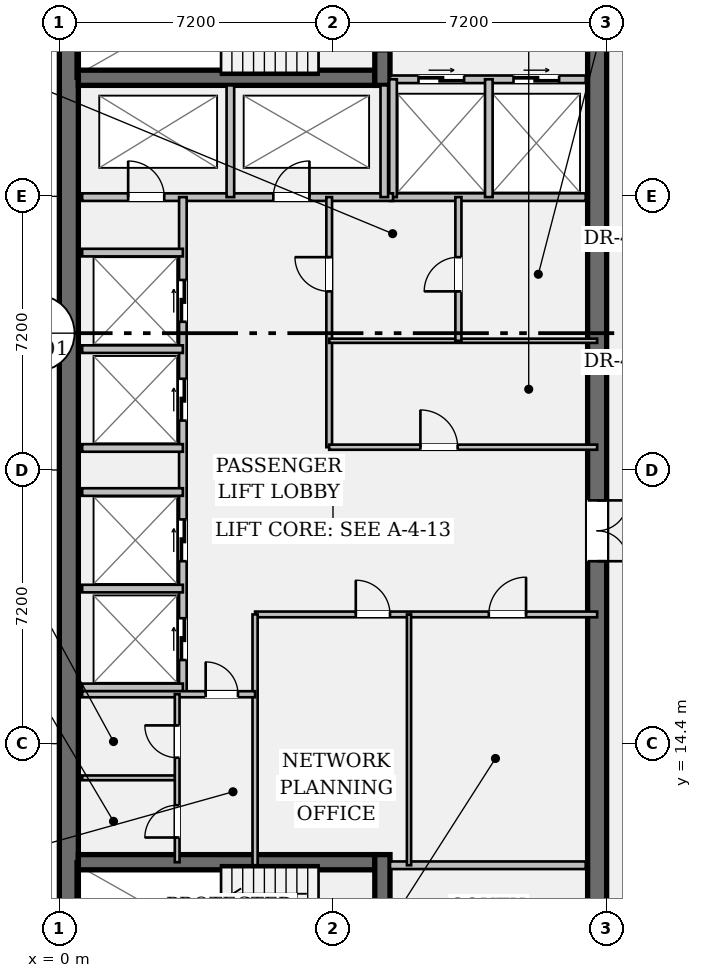
"""IFC4 building model, lengths in metres.
Left out: names, types, materials, properties, quantities, classifications, styles, units other than length and angle.
Written with IfcOpenShell. Run it as: python <this file> out.ifc"""

import sys

from ifc_helpers import new_model, si_unit, direction, frame, frame_2d, origin, place, context, subcontext, project, spatial, rectangle, extrude, element, fill, save


model = new_model("IFC4")
c1 = context("Model", 3, precision=1e-05, world=origin(), true_north=direction((0.0, 1.0)))
c2 = subcontext(c1, "Body", "Model", "MODEL_VIEW")
j1 = project(units=[si_unit("LENGTHUNIT", "METRE"), si_unit("PLANEANGLEUNIT", "RADIAN")], contexts=[c1])
p1 = place(None, origin())
s1 = spatial("IfcSite", under=j1, at=p1, CompositionType="ELEMENT")
p2 = place(p1, origin())
s2 = spatial("IfcBuilding", under=s1, at=p2, CompositionType="ELEMENT")
p3 = place(p2, frame((0.0, 0.0, 290.15)))
s3 = spatial("IfcBuildingStorey", under=s2, at=p3, CompositionType="ELEMENT", Elevation=290.15)
p4 = place(p3, frame((0.25, 7.2, 0.0), z_axis=(0.0, 0.0, 1.0), x_axis=(0.0, 1.0, 0.0)))
e1 = element("IfcWall", 1, at=p4, inside=s3, PredefinedType="SHEAR", context=c2, shape_type="SweptSolid", body=[
    extrude(rectangle(XDim=28.8, YDim=0.5, at=frame_2d((14.4, 0.0))), origin(), (0.0, 0.0, 1.0), 3.24),
])
p5 = place(p3, frame((14.15, 35.5, 0.0), z_axis=(0.0, 0.0, 1.0), x_axis=(0.0, -1.0, 0.0)))
e2 = element("IfcWall", 2, at=p5, inside=s3, PredefinedType="SHEAR", context=c2, shape_type="SweptSolid", body=[
    extrude(rectangle(XDim=27.8, YDim=0.5, at=frame_2d((13.9, 0.0))), origin(), (0.0, 0.0, 1.0), 3.24),
])
p6 = place(p5, frame((1.4, 0.0, 0.0)))
e3 = element("IfcOpeningElement", 3, at=p6, cuts=e2, PredefinedType="OPENING", context=c2, shape_type="SweptSolid", body=[
    extrude(rectangle(XDim=1.2, YDim=2.15, at=frame_2d((0.6, 1.075))), frame((0.0, 0.262, 0.0), z_axis=(0.0, -1.0, 0.0), x_axis=(1.0, 0.0, 0.0)), (0.0, 0.0, 1.0), 0.524),
])
p7 = place(p5, frame((25.35, 0.0, 0.0)))
e4 = element("IfcOpeningElement", 4, at=p7, cuts=e2, PredefinedType="OPENING", context=c2, shape_type="SweptSolid", body=[
    extrude(rectangle(XDim=1.2, YDim=2.15, at=frame_2d((0.6, 1.075))), frame((0.0, 0.262, 0.0), z_axis=(0.0, -1.0, 0.0), x_axis=(1.0, 0.0, 0.0)), (0.0, 0.0, 1.0), 0.524),
])
p8 = place(p5, frame((14.7, 0.0, 0.0)))
e5 = element("IfcOpeningElement", 5, at=p8, cuts=e2, PredefinedType="OPENING", context=c2, shape_type="SweptSolid", body=[
    extrude(rectangle(XDim=1.6, YDim=2.2, at=frame_2d((0.8, 1.1))), frame((0.0, 0.262, 0.0), z_axis=(0.0, -1.0, 0.0), x_axis=(1.0, 0.0, 0.0)), (0.0, 0.0, 1.0), 0.524),
])
for number, where, z_axis, x_axis in (
    (6, (0.5, 31.92, 0.0), (0.0, 0.0, 1.0), (1.0, 0.0, 0.0)),
    (7, (0.5, 11.28, 0.0), (0.0, 0.0, 1.0), (1.0, 0.0, 0.0)),
):
    element("IfcWall", number, at=place(p3, frame(where, z_axis=z_axis, x_axis=x_axis)), inside=s3, PredefinedType="SHEAR", context=c2, shape_type="SweptSolid", body=[
        extrude(rectangle(XDim=7.8, YDim=0.4, at=frame_2d((3.9, 0.0))), origin(), (0.0, 0.0, 1.0), 3.24),
    ])
p9 = place(p3, frame((8.5, 31.72, 0.0), z_axis=(0.0, 0.0, 1.0), x_axis=(0.0, 1.0, 0.0)))
e8 = element("IfcWall", 8, at=p9, inside=s3, PredefinedType="SHEAR", context=c2, shape_type="SweptSolid", body=[
    extrude(rectangle(XDim=3.78, YDim=0.4, at=frame_2d((1.89, 0.0))), origin(), (0.0, 0.0, 1.0), 3.24),
])
p10 = place(p9, frame((0.9, 0.0, 0.0)))
e9 = element("IfcOpeningElement", 9, at=p10, cuts=e8, PredefinedType="OPENING", context=c2, shape_type="SweptSolid", body=[
    extrude(rectangle(XDim=1.1, YDim=2.15, at=frame_2d((0.55, 1.075))), frame((0.0, 0.212, 0.0), z_axis=(0.0, -1.0, 0.0), x_axis=(1.0, 0.0, 0.0)), (0.0, 0.0, 1.0), 0.424),
])
p11 = place(p3, frame((8.5, 7.7, 0.0), z_axis=(0.0, 0.0, 1.0), x_axis=(0.0, 1.0, 0.0)))
e10 = element("IfcWall", 10, at=p11, inside=s3, PredefinedType="SHEAR", context=c2, shape_type="SweptSolid", body=[
    extrude(rectangle(XDim=3.78, YDim=0.4, at=frame_2d((1.89, 0.0))), origin(), (0.0, 0.0, 1.0), 3.24),
])
p12 = place(p11, frame((0.85, 0.0, 0.0)))
e11 = element("IfcOpeningElement", 11, at=p12, cuts=e10, PredefinedType="OPENING", context=c2, shape_type="SweptSolid", body=[
    extrude(rectangle(XDim=1.1, YDim=2.15, at=frame_2d((0.55, 1.075))), frame((0.0, 0.212, 0.0), z_axis=(0.0, -1.0, 0.0), x_axis=(1.0, 0.0, 0.0)), (0.0, 0.0, 1.0), 0.424),
])
p13 = place(p3, frame((8.7, 31.88, 0.0), z_axis=(0.0, 0.0, 1.0), x_axis=(1.0, 0.0, 0.0)))
e12 = element("IfcWall", 12, at=p13, inside=s3, PredefinedType="PARTITIONING", context=c2, shape_type="SweptSolid", body=[
    extrude(rectangle(XDim=5.15, YDim=0.2, at=frame_2d((2.575, 0.0))), origin(), (0.0, 0.0, 1.0), 3.24),
])
p14 = place(p13, frame((0.75, 0.0, 0.0)))
e13 = element("IfcOpeningElement", 13, at=p14, cuts=e12, PredefinedType="OPENING", context=c2, shape_type="SweptSolid", body=[
    extrude(rectangle(XDim=1.2, YDim=2.2, at=frame_2d((0.6, 1.1))), frame((0.0, 0.112, 0.0), z_axis=(0.0, -1.0, 0.0), x_axis=(1.0, 0.0, 0.0)), (0.0, 0.0, 1.0), 0.224),
])
p15 = place(p13, frame((3.25, 0.0, 0.0)))
e14 = element("IfcOpeningElement", 14, at=p15, cuts=e12, PredefinedType="OPENING", context=c2, shape_type="SweptSolid", body=[
    extrude(rectangle(XDim=1.2, YDim=2.2, at=frame_2d((0.6, 1.1))), frame((0.0, 0.112, 0.0), z_axis=(0.0, -1.0, 0.0), x_axis=(1.0, 0.0, 0.0)), (0.0, 0.0, 1.0), 0.224),
])
for number, where, z_axis, x_axis in (
    (15, (8.7, 11.2, 0.0), (0.0, 0.0, 1.0), (1.0, 0.0, 0.0)),
    (16, (8.7, 28.78, 0.0), (0.0, 0.0, 1.0), (1.0, 0.0, 0.0)),
):
    element("IfcWall", number, at=place(p3, frame(where, z_axis=z_axis, x_axis=x_axis)), inside=s3, PredefinedType="PARTITIONING", context=c2, shape_type="SweptSolid", body=[
        extrude(rectangle(XDim=5.15, YDim=0.2, at=frame_2d((2.575, 0.0))), origin(), (0.0, 0.0, 1.0), 3.24),
    ])
for number, where, z_axis, x_axis in (
    (17, (8.78, 28.78, 0.0), (0.0, 0.0, 1.0), (0.0, 1.0, 0.0)),
    (18, (11.3, 28.78, 0.0), (0.0, 0.0, 1.0), (0.0, 1.0, 0.0)),
):
    element("IfcWall", number, at=place(p3, frame(where, z_axis=z_axis, x_axis=x_axis)), inside=s3, PredefinedType="PARTITIONING", context=c2, shape_type="SweptSolid", body=[
        extrude(rectangle(XDim=3.1, YDim=0.2, at=frame_2d((1.55, 0.0))), origin(), (0.0, 0.0, 1.0), 3.24),
    ])
p16 = place(p3, frame((0.6, 28.78, 0.0), z_axis=(0.0, 0.0, 1.0), x_axis=(1.0, 0.0, 0.0)))
e19 = element("IfcWall", 19, at=p16, inside=s3, PredefinedType="PARTITIONING", context=c2, shape_type="SweptSolid", body=[
    extrude(rectangle(XDim=8.18, YDim=0.2, at=frame_2d((4.09, 0.0))), origin(), (0.0, 0.0, 1.0), 3.24),
])
p17 = place(p16, frame((1.21, 0.0, 0.0)))
e20 = element("IfcOpeningElement", 20, at=p17, cuts=e19, PredefinedType="OPENING", context=c2, shape_type="SweptSolid", body=[
    extrude(rectangle(XDim=0.95, YDim=2.15, at=frame_2d((0.475, 1.075))), frame((0.0, 0.112, 0.0), z_axis=(0.0, -1.0, 0.0), x_axis=(1.0, 0.0, 0.0)), (0.0, 0.0, 1.0), 0.224),
])
p18 = place(p16, frame((5.03, 0.0, 0.0)))
e21 = element("IfcOpeningElement", 21, at=p18, cuts=e19, PredefinedType="OPENING", context=c2, shape_type="SweptSolid", body=[
    extrude(rectangle(XDim=0.95, YDim=2.15, at=frame_2d((0.475, 1.075))), frame((0.0, 0.112, 0.0), z_axis=(0.0, -1.0, 0.0), x_axis=(1.0, 0.0, 0.0)), (0.0, 0.0, 1.0), 0.224),
])
for number, where, z_axis, x_axis in (
    (22, (4.5, 28.78, 0.0), (0.0, 0.0, 1.0), (0.0, 1.0, 0.0)),
    (23, (8.55, 28.78, 0.0), (0.0, 0.0, 1.0), (0.0, 1.0, 0.0)),
):
    element("IfcWall", number, at=place(p3, frame(where, z_axis=z_axis, x_axis=x_axis)), inside=s3, PredefinedType="PARTITIONING", context=c2, shape_type="SweptSolid", body=[
        extrude(rectangle(XDim=2.94, YDim=0.2, at=frame_2d((1.47, 0.0))), origin(), (0.0, 0.0, 1.0), 3.24),
    ])
p19 = place(p3, frame((3.25, 15.7, 0.0), z_axis=(0.0, 0.0, 1.0), x_axis=(0.0, 1.0, 0.0)))
e24 = element("IfcWall", 24, at=p19, inside=s3, PredefinedType="PARTITIONING", context=c2, shape_type="SweptSolid", body=[
    extrude(rectangle(XDim=13.08, YDim=0.2, at=frame_2d((6.54, 0.0))), origin(), (0.0, 0.0, 1.0), 3.24),
])
p20 = place(p19, frame((0.9, 0.0, 0.0)))
e25 = element("IfcOpeningElement", 25, at=p20, cuts=e24, PredefinedType="OPENING", context=c2, shape_type="SweptSolid", body=[
    extrude(rectangle(XDim=1.1, YDim=2.2, at=frame_2d((0.55, 1.1))), frame((0.0, 0.112, 0.0), z_axis=(0.0, -1.0, 0.0), x_axis=(1.0, 0.0, 0.0)), (0.0, 0.0, 1.0), 0.224),
])
p21 = place(p19, frame((3.5, 0.0, 0.0)))
e26 = element("IfcOpeningElement", 26, at=p21, cuts=e24, PredefinedType="OPENING", context=c2, shape_type="SweptSolid", body=[
    extrude(rectangle(XDim=1.1, YDim=2.2, at=frame_2d((0.55, 1.1))), frame((0.0, 0.112, 0.0), z_axis=(0.0, -1.0, 0.0), x_axis=(1.0, 0.0, 0.0)), (0.0, 0.0, 1.0), 0.224),
])
p22 = place(p19, frame((7.2, 0.0, 0.0)))
e27 = element("IfcOpeningElement", 27, at=p22, cuts=e24, PredefinedType="OPENING", context=c2, shape_type="SweptSolid", body=[
    extrude(rectangle(XDim=1.1, YDim=2.2, at=frame_2d((0.55, 1.1))), frame((0.0, 0.112, 0.0), z_axis=(0.0, -1.0, 0.0), x_axis=(1.0, 0.0, 0.0)), (0.0, 0.0, 1.0), 0.224),
])
p23 = place(p19, frame((9.8, 0.0, 0.0)))
e28 = element("IfcOpeningElement", 28, at=p23, cuts=e24, PredefinedType="OPENING", context=c2, shape_type="SweptSolid", body=[
    extrude(rectangle(XDim=1.1, YDim=2.2, at=frame_2d((0.55, 1.1))), frame((0.0, 0.112, 0.0), z_axis=(0.0, -1.0, 0.0), x_axis=(1.0, 0.0, 0.0)), (0.0, 0.0, 1.0), 0.224),
])
for number, where, z_axis, x_axis in (
    (29, (0.6, 15.88, 0.0), (0.0, 0.0, 1.0), (1.0, 0.0, 0.0)),
    (30, (0.6, 18.48, 0.0), (0.0, 0.0, 1.0), (1.0, 0.0, 0.0)),
    (31, (0.6, 22.18, 0.0), (0.0, 0.0, 1.0), (1.0, 0.0, 0.0)),
    (32, (0.6, 24.78, 0.0), (0.0, 0.0, 1.0), (1.0, 0.0, 0.0)),
    (33, (0.6, 21.02, 0.0), (0.0, 0.0, 1.0), (1.0, 0.0, 0.0)),
    (34, (0.6, 27.32, 0.0), (0.0, 0.0, 1.0), (1.0, 0.0, 0.0)),
):
    element("IfcWall", number, at=place(p3, frame(where, z_axis=z_axis, x_axis=x_axis)), inside=s3, PredefinedType="PARTITIONING", context=c2, shape_type="SweptSolid", body=[
        extrude(rectangle(XDim=2.65, YDim=0.2, at=frame_2d((1.325, 0.0))), origin(), (0.0, 0.0, 1.0), 3.24),
    ])
p24 = place(p3, frame((7.1, 22.2, 0.0), z_axis=(0.0, 0.0, 1.0), x_axis=(0.0, 1.0, 0.0)))
e35 = element("IfcWall", 35, at=p24, inside=s3, PredefinedType="PARTITIONING", context=c2, shape_type="SweptSolid", body=[
    extrude(rectangle(XDim=6.58, YDim=0.15, at=frame_2d((3.29, 0.0))), origin(), (0.0, 0.0, 1.0), 3.24),
])
p25 = place(p24, frame((4.1, 0.0, 0.0)))
e36 = element("IfcOpeningElement", 36, at=p25, cuts=e35, PredefinedType="OPENING", context=c2, shape_type="SweptSolid", body=[
    extrude(rectangle(XDim=0.9, YDim=2.15, at=frame_2d((0.45, 1.075))), frame((0.0, 0.087, 0.0), z_axis=(0.0, -1.0, 0.0), x_axis=(1.0, 0.0, 0.0)), (0.0, 0.0, 1.0), 0.174),
])
p26 = place(p3, frame((7.1, 22.2, 0.0), z_axis=(0.0, 0.0, 1.0), x_axis=(1.0, 0.0, 0.0)))
e37 = element("IfcWall", 37, at=p26, inside=s3, PredefinedType="PARTITIONING", context=c2, shape_type="SweptSolid", body=[
    extrude(rectangle(XDim=7.05, YDim=0.135, at=frame_2d((3.525, 0.0))), origin(), (0.0, 0.0, 1.0), 3.24),
])
p27 = place(p26, frame((2.4, 0.0, 0.0)))
e38 = element("IfcOpeningElement", 38, at=p27, cuts=e37, PredefinedType="OPENING", context=c2, shape_type="SweptSolid", body=[
    extrude(rectangle(XDim=0.98, YDim=2.15, at=frame_2d((0.49, 1.075))), frame((0.0, 0.08, 0.0), z_axis=(0.0, -1.0, 0.0), x_axis=(1.0, 0.0, 0.0)), (0.0, 0.0, 1.0), 0.159),
])
p28 = place(p3, frame((7.1, 25.0, 0.0), z_axis=(0.0, 0.0, 1.0), x_axis=(1.0, 0.0, 0.0)))
e39 = element("IfcWall", 39, at=p28, inside=s3, PredefinedType="PARTITIONING", context=c2, shape_type="SweptSolid", body=[
    extrude(rectangle(XDim=7.05, YDim=0.11, at=frame_2d((3.525, 0.0))), origin(), (0.0, 0.0, 1.0), 3.24),
])
p29 = place(p3, frame((10.5, 25.0, 0.0), z_axis=(0.0, 0.0, 1.0), x_axis=(0.0, 1.0, 0.0)))
e40 = element("IfcWall", 40, at=p29, inside=s3, PredefinedType="PARTITIONING", context=c2, shape_type="SweptSolid", body=[
    extrude(rectangle(XDim=3.78, YDim=0.16, at=frame_2d((1.89, 0.0))), origin(), (0.0, 0.0, 1.0), 3.24),
])
p30 = place(p29, frame((1.3, 0.0, 0.0)))
e41 = element("IfcOpeningElement", 41, at=p30, cuts=e40, PredefinedType="OPENING", context=c2, shape_type="SweptSolid", body=[
    extrude(rectangle(XDim=0.9, YDim=2.15, at=frame_2d((0.45, 1.075))), frame((0.0, 0.092, 0.0), z_axis=(0.0, -1.0, 0.0), x_axis=(1.0, 0.0, 0.0)), (0.0, 0.0, 1.0), 0.184),
])
p31 = place(p3, frame((5.15, 17.8, 0.0), z_axis=(0.0, 0.0, 1.0), x_axis=(1.0, 0.0, 0.0)))
e42 = element("IfcWall", 42, at=p31, inside=s3, PredefinedType="PARTITIONING", context=c2, shape_type="SweptSolid", body=[
    extrude(rectangle(XDim=9.0, YDim=0.15, at=frame_2d((4.5, 0.0))), origin(), (0.0, 0.0, 1.0), 3.24),
])
p32 = place(p31, frame((2.65, 0.0, 0.0)))
e43 = element("IfcOpeningElement", 43, at=p32, cuts=e42, PredefinedType="OPENING", context=c2, shape_type="SweptSolid", body=[
    extrude(rectangle(XDim=0.9, YDim=2.15, at=frame_2d((0.45, 1.075))), frame((0.0, 0.087, 0.0), z_axis=(0.0, -1.0, 0.0), x_axis=(1.0, 0.0, 0.0)), (0.0, 0.0, 1.0), 0.174),
])
p33 = place(p31, frame((6.15, 0.0, 0.0)))
e44 = element("IfcOpeningElement", 44, at=p33, cuts=e42, PredefinedType="OPENING", context=c2, shape_type="SweptSolid", body=[
    extrude(rectangle(XDim=0.98, YDim=2.15, at=frame_2d((0.49, 1.075))), frame((0.0, 0.087, 0.0), z_axis=(0.0, -1.0, 0.0), x_axis=(1.0, 0.0, 0.0)), (0.0, 0.0, 1.0), 0.174),
])
p34 = place(p3, frame((5.15, 11.2, 0.0), z_axis=(0.0, 0.0, 1.0), x_axis=(0.0, 1.0, 0.0)))
e45 = element("IfcWall", 45, at=p34, inside=s3, PredefinedType="PARTITIONING", context=c2, shape_type="SweptSolid", body=[
    extrude(rectangle(XDim=6.6, YDim=0.135, at=frame_2d((3.3, 0.0))), origin(), (0.0, 0.0, 1.0), 3.24),
])
p35 = place(p3, frame((9.2, 11.2, 0.0), z_axis=(0.0, 0.0, 1.0), x_axis=(0.0, 1.0, 0.0)))
e46 = element("IfcWall", 46, at=p35, inside=s3, PredefinedType="PARTITIONING", context=c2, shape_type="SweptSolid", body=[
    extrude(rectangle(XDim=6.6, YDim=0.11, at=frame_2d((3.3, 0.0))), origin(), (0.0, 0.0, 1.0), 3.24),
])
p36 = place(p3, frame((0.6, 15.7, 0.0), z_axis=(0.0, 0.0, 1.0), x_axis=(1.0, 0.0, 0.0)))
e47 = element("IfcWall", 47, at=p36, inside=s3, PredefinedType="PARTITIONING", context=c2, shape_type="SweptSolid", body=[
    extrude(rectangle(XDim=4.55, YDim=0.16, at=frame_2d((2.275, 0.0))), origin(), (0.0, 0.0, 1.0), 3.24),
])
p37 = place(p36, frame((3.25, 0.0, 0.0)))
e48 = element("IfcOpeningElement", 48, at=p37, cuts=e47, PredefinedType="OPENING", context=c2, shape_type="SweptSolid", body=[
    extrude(rectangle(XDim=0.85, YDim=2.15, at=frame_2d((0.425, 1.075))), frame((0.0, 0.092, 0.0), z_axis=(0.0, -1.0, 0.0), x_axis=(1.0, 0.0, 0.0)), (0.0, 0.0, 1.0), 0.184),
])
p38 = place(p3, frame((0.6, 13.5, 0.0), z_axis=(0.0, 0.0, 1.0), x_axis=(1.0, 0.0, 0.0)))
e49 = element("IfcWall", 49, at=p38, inside=s3, PredefinedType="PARTITIONING", context=c2, shape_type="SweptSolid", body=[
    extrude(rectangle(XDim=2.5, YDim=0.125, at=frame_2d((1.25, 0.0))), origin(), (0.0, 0.0, 1.0), 3.24),
])
p39 = place(p3, frame((3.1, 11.28, 0.0), z_axis=(0.0, 0.0, 1.0), x_axis=(0.0, 1.0, 0.0)))
e50 = element("IfcWall", 50, at=p39, inside=s3, PredefinedType="PARTITIONING", context=c2, shape_type="SweptSolid", body=[
    extrude(rectangle(XDim=4.42, YDim=0.125, at=frame_2d((2.21, 0.0))), origin(), (0.0, 0.0, 1.0), 3.24),
])
p40 = place(p39, frame((0.65, 0.0, 0.0)))
e51 = element("IfcOpeningElement", 51, at=p40, cuts=e50, PredefinedType="OPENING", context=c2, shape_type="SweptSolid", body=[
    extrude(rectangle(XDim=0.85, YDim=2.15, at=frame_2d((0.425, 1.075))), frame((0.0, 0.074, 0.0), z_axis=(0.0, -1.0, 0.0), x_axis=(1.0, 0.0, 0.0)), (0.0, 0.0, 1.0), 0.149),
])
p41 = place(p39, frame((2.75, 0.0, 0.0)))
e52 = element("IfcOpeningElement", 52, at=p41, cuts=e50, PredefinedType="OPENING", context=c2, shape_type="SweptSolid", body=[
    extrude(rectangle(XDim=0.85, YDim=2.15, at=frame_2d((0.425, 1.075))), frame((0.0, 0.074, 0.0), z_axis=(0.0, -1.0, 0.0), x_axis=(1.0, 0.0, 0.0)), (0.0, 0.0, 1.0), 0.149),
])
p42 = place(p14, origin())
e53 = element("IfcDoor", 53, at=p42, inside=s3, OperationType="DOUBLE_DOOR_SLIDING", PredefinedType="DOOR", context=c2, shape_type="SweptSolid", body=[
    extrude(rectangle(XDim=1.2, YDim=2.2, at=frame_2d((0.6, 1.1))), frame((0.0, 0.025, 0.0), z_axis=(0.0, -1.0, 0.0), x_axis=(1.0, 0.0, 0.0)), (0.0, 0.0, 1.0), 0.05),
])
fill(e13, e53)
p43 = place(p15, origin())
e54 = element("IfcDoor", 54, at=p43, inside=s3, OperationType="DOUBLE_DOOR_SLIDING", PredefinedType="DOOR", context=c2, shape_type="SweptSolid", body=[
    extrude(rectangle(XDim=1.2, YDim=2.2, at=frame_2d((0.6, 1.1))), frame((0.0, 0.025, 0.0), z_axis=(0.0, -1.0, 0.0), x_axis=(1.0, 0.0, 0.0)), (0.0, 0.0, 1.0), 0.05),
])
fill(e14, e54)
p44 = place(p17, origin())
e55 = element("IfcDoor", 55, at=p44, inside=s3, OperationType="SINGLE_SWING_LEFT", PredefinedType="DOOR", context=c2, shape_type="SweptSolid", body=[
    extrude(rectangle(XDim=0.95, YDim=2.15, at=frame_2d((0.475, 1.075))), frame((0.0, 0.025, 0.0), z_axis=(0.0, -1.0, 0.0), x_axis=(1.0, 0.0, 0.0)), (0.0, 0.0, 1.0), 0.05),
])
fill(e20, e55)
p45 = place(p18, origin())
e56 = element("IfcDoor", 56, at=p45, inside=s3, OperationType="SINGLE_SWING_RIGHT", PredefinedType="DOOR", context=c2, shape_type="SweptSolid", body=[
    extrude(rectangle(XDim=0.95, YDim=2.15, at=frame_2d((0.475, 1.075))), frame((0.0, 0.025, 0.0), z_axis=(0.0, -1.0, 0.0), x_axis=(1.0, 0.0, 0.0)), (0.0, 0.0, 1.0), 0.05),
])
fill(e21, e56)
p46 = place(p8, origin())
e57 = element("IfcDoor", 57, at=p46, inside=s3, OperationType="DOUBLE_DOOR_SINGLE_SWING", PredefinedType="DOOR", context=c2, shape_type="SweptSolid", body=[
    extrude(rectangle(XDim=1.6, YDim=2.2, at=frame_2d((0.8, 1.1))), frame((0.0, 0.025, 0.0), z_axis=(0.0, -1.0, 0.0), x_axis=(1.0, 0.0, 0.0)), (0.0, 0.0, 1.0), 0.05),
])
fill(e5, e57)
p47 = place(p20, origin())
e58 = element("IfcDoor", 58, at=p47, inside=s3, OperationType="DOUBLE_DOOR_SLIDING", PredefinedType="DOOR", context=c2, shape_type="SweptSolid", body=[
    extrude(rectangle(XDim=1.1, YDim=2.2, at=frame_2d((0.55, 1.1))), frame((0.0, 0.025, 0.0), z_axis=(0.0, -1.0, 0.0), x_axis=(1.0, 0.0, 0.0)), (0.0, 0.0, 1.0), 0.05),
])
fill(e25, e58)
p48 = place(p21, origin())
e59 = element("IfcDoor", 59, at=p48, inside=s3, OperationType="DOUBLE_DOOR_SLIDING", PredefinedType="DOOR", context=c2, shape_type="SweptSolid", body=[
    extrude(rectangle(XDim=1.1, YDim=2.2, at=frame_2d((0.55, 1.1))), frame((0.0, 0.025, 0.0), z_axis=(0.0, -1.0, 0.0), x_axis=(1.0, 0.0, 0.0)), (0.0, 0.0, 1.0), 0.05),
])
fill(e26, e59)
p49 = place(p22, origin())
e60 = element("IfcDoor", 60, at=p49, inside=s3, OperationType="DOUBLE_DOOR_SLIDING", PredefinedType="DOOR", context=c2, shape_type="SweptSolid", body=[
    extrude(rectangle(XDim=1.1, YDim=2.2, at=frame_2d((0.55, 1.1))), frame((0.0, 0.025, 0.0), z_axis=(0.0, -1.0, 0.0), x_axis=(1.0, 0.0, 0.0)), (0.0, 0.0, 1.0), 0.05),
])
fill(e27, e60)
p50 = place(p23, origin())
e61 = element("IfcDoor", 61, at=p50, inside=s3, OperationType="DOUBLE_DOOR_SLIDING", PredefinedType="DOOR", context=c2, shape_type="SweptSolid", body=[
    extrude(rectangle(XDim=1.1, YDim=2.2, at=frame_2d((0.55, 1.1))), frame((0.0, 0.025, 0.0), z_axis=(0.0, -1.0, 0.0), x_axis=(1.0, 0.0, 0.0)), (0.0, 0.0, 1.0), 0.05),
])
fill(e28, e61)
p51 = place(p27, origin())
e62 = element("IfcDoor", 62, at=p51, inside=s3, OperationType="SINGLE_SWING_LEFT", PredefinedType="DOOR", context=c2, shape_type="SweptSolid", body=[
    extrude(rectangle(XDim=0.98, YDim=2.15, at=frame_2d((0.49, 1.075))), frame((0.0, 0.025, 0.0), z_axis=(0.0, -1.0, 0.0), x_axis=(1.0, 0.0, 0.0)), (0.0, 0.0, 1.0), 0.05),
])
fill(e38, e62)
p52 = place(p25, origin())
e63 = element("IfcDoor", 63, at=p52, inside=s3, OperationType="SINGLE_SWING_RIGHT", PredefinedType="DOOR", context=c2, shape_type="SweptSolid", body=[
    extrude(rectangle(XDim=0.9, YDim=2.15, at=frame_2d((0.45, 1.075))), frame((0.0, 0.025, 0.0), z_axis=(0.0, -1.0, 0.0), x_axis=(1.0, 0.0, 0.0)), (0.0, 0.0, 1.0), 0.05),
])
fill(e36, e63)
p53 = place(p30, origin())
e64 = element("IfcDoor", 64, at=p53, inside=s3, OperationType="SINGLE_SWING_LEFT", PredefinedType="DOOR", context=c2, shape_type="SweptSolid", body=[
    extrude(rectangle(XDim=0.9, YDim=2.15, at=frame_2d((0.45, 1.075))), frame((0.0, 0.025, 0.0), z_axis=(0.0, -1.0, 0.0), x_axis=(1.0, 0.0, 0.0)), (0.0, 0.0, 1.0), 0.05),
])
fill(e41, e64)
p54 = place(p32, origin())
e65 = element("IfcDoor", 65, at=p54, inside=s3, OperationType="SINGLE_SWING_LEFT", PredefinedType="DOOR", context=c2, shape_type="SweptSolid", body=[
    extrude(rectangle(XDim=0.9, YDim=2.15, at=frame_2d((0.45, 1.075))), frame((0.0, 0.025, 0.0), z_axis=(0.0, -1.0, 0.0), x_axis=(1.0, 0.0, 0.0)), (0.0, 0.0, 1.0), 0.05),
])
fill(e43, e65)
p55 = place(p33, origin())
e66 = element("IfcDoor", 66, at=p55, inside=s3, OperationType="SINGLE_SWING_RIGHT", PredefinedType="DOOR", context=c2, shape_type="SweptSolid", body=[
    extrude(rectangle(XDim=0.98, YDim=2.15, at=frame_2d((0.49, 1.075))), frame((0.0, 0.025, 0.0), z_axis=(0.0, -1.0, 0.0), x_axis=(1.0, 0.0, 0.0)), (0.0, 0.0, 1.0), 0.05),
])
fill(e44, e66)
p56 = place(p37, origin())
e67 = element("IfcDoor", 67, at=p56, inside=s3, OperationType="SINGLE_SWING_LEFT", PredefinedType="DOOR", context=c2, shape_type="SweptSolid", body=[
    extrude(rectangle(XDim=0.85, YDim=2.15, at=frame_2d((0.425, 1.075))), frame((0.0, 0.025, 0.0), z_axis=(0.0, -1.0, 0.0), x_axis=(1.0, 0.0, 0.0)), (0.0, 0.0, 1.0), 0.05),
])
fill(e48, e67)
p57 = place(p40, origin())
e68 = element("IfcDoor", 68, at=p57, inside=s3, OperationType="SINGLE_SWING_LEFT", PredefinedType="DOOR", context=c2, shape_type="SweptSolid", body=[
    extrude(rectangle(XDim=0.85, YDim=2.15, at=frame_2d((0.425, 1.075))), frame((0.0, 0.025, 0.0), z_axis=(0.0, -1.0, 0.0), x_axis=(1.0, 0.0, 0.0)), (0.0, 0.0, 1.0), 0.05),
])
fill(e51, e68)
p58 = place(p41, origin())
e69 = element("IfcDoor", 69, at=p58, inside=s3, OperationType="SINGLE_SWING_RIGHT", PredefinedType="DOOR", context=c2, shape_type="SweptSolid", body=[
    extrude(rectangle(XDim=0.85, YDim=2.15, at=frame_2d((0.425, 1.075))), frame((0.0, 0.025, 0.0), z_axis=(0.0, -1.0, 0.0), x_axis=(1.0, 0.0, 0.0)), (0.0, 0.0, 1.0), 0.05),
])
fill(e52, e69)
save(model, sys.argv[1])
